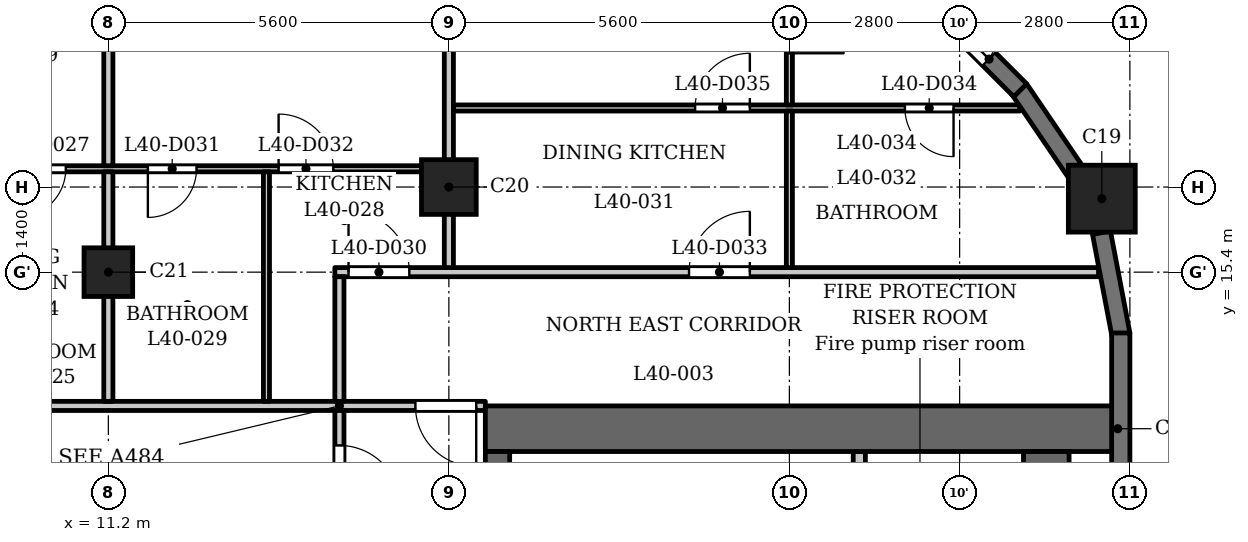
"""IFC4 building model, lengths in metres.
Left out: names, types, materials, properties, quantities, classifications, styles, units other than length and angle.
Written with IfcOpenShell. Run it as: python <this file> out.ifc"""

import sys

from ifc_helpers import new_model, si_unit, direction, frame, frame_2d, origin, origin_2d, place, context, subcontext, project, spatial, rectangle, extrude, element, fill, save


model = new_model("IFC4")
c1 = context("Model", 3, precision=1e-05, world=origin(), true_north=direction((0.0, 1.0)))
c2 = subcontext(c1, "Body", "Model", "MODEL_VIEW")
j1 = project(units=[si_unit("LENGTHUNIT", "METRE"), si_unit("PLANEANGLEUNIT", "RADIAN")], contexts=[c1])
p1 = place(None, origin())
s1 = spatial("IfcSite", under=j1, at=p1, CompositionType="ELEMENT")
p2 = place(p1, origin())
s2 = spatial("IfcBuilding", under=s1, at=p2, CompositionType="ELEMENT")
p3 = place(p2, frame((0.0, 0.0, 157.1)))
s3 = spatial("IfcBuildingStorey", under=s2, at=p3, CompositionType="ELEMENT", Elevation=157.1)
p4 = place(p3, frame((27.538, 16.609, 0.0), z_axis=(0.0, 0.0, 1.0), x_axis=(1.0, 0.0, 0.0)))
e1 = element("IfcColumn", 1, at=p4, inside=s3, PredefinedType="COLUMN", context=c2, shape_type="SweptSolid", body=[
    extrude(rectangle(XDim=1.1, YDim=1.1, at=origin_2d()), origin(), (0.0, 0.0, 1.0), 3.5),
])
p5 = place(p3, frame((16.8, 16.8, 0.0), z_axis=(0.0, 0.0, 1.0), x_axis=(1.0, 0.0, 0.0)))
e2 = element("IfcColumn", 2, at=p5, inside=s3, PredefinedType="COLUMN", context=c2, shape_type="SweptSolid", body=[
    extrude(rectangle(XDim=0.9, YDim=0.9, at=origin_2d()), origin(), (0.0, 0.0, 1.0), 3.5),
])
p6 = place(p3, frame((11.2, 15.4, 0.0), z_axis=(0.0, 0.0, 1.0), x_axis=(1.0, 0.0, 0.0)))
e3 = element("IfcColumn", 3, at=p6, inside=s3, PredefinedType="COLUMN", context=c2, shape_type="SweptSolid", body=[
    extrude(rectangle(XDim=0.8, YDim=0.8, at=origin_2d()), origin(), (0.0, 0.0, 1.0), 3.5),
])
p7 = place(p3, frame((27.85, 11.75, 0.0), z_axis=(0.0, 0.0, 1.0), x_axis=(0.0, 1.0, 0.0)))
e4 = element("IfcWall", 4, at=p7, inside=s3, PredefinedType="SOLIDWALL", context=c2, shape_type="SweptSolid", body=[
    extrude(rectangle(XDim=2.65, YDim=0.3, at=frame_2d((1.325, 0.0))), origin(), (0.0, 0.0, 1.0), 2.45),
])
p8 = place(p3, frame((27.853, 14.372, 0.0), z_axis=(0.0, 0.0, 1.0), x_axis=(-0.187302784601, 0.982302227871, 0.0)))
e5 = element("IfcWall", 5, at=p8, inside=s3, PredefinedType="SOLIDWALL", context=c2, shape_type="SweptSolid", body=[
    extrude(rectangle(XDim=1.706, YDim=0.3, at=frame_2d((0.853, 0.0))), origin(), (0.0, 0.0, 1.0), 2.45),
])
p9 = place(p3, frame((27.138, 17.002, 0.0), z_axis=(0.0, 0.0, 1.0), x_axis=(-0.562075160946, 0.827086158419, 0.0)))
e6 = element("IfcWall", 6, at=p9, inside=s3, PredefinedType="SOLIDWALL", context=c2, shape_type="SweptSolid", body=[
    extrude(rectangle(XDim=1.706, YDim=0.3, at=frame_2d((0.853, 0.0))), origin(), (0.0, 0.0, 1.0), 2.45),
])
p10 = place(p3, frame((26.197, 18.391, 0.0), z_axis=(0.0, 0.0, 1.0), x_axis=(-0.707060717099, 0.707152842274, 0.0)))
e7 = element("IfcWall", 7, at=p10, inside=s3, PredefinedType="SOLIDWALL", context=c2, shape_type="SweptSolid", body=[
    extrude(rectangle(XDim=2.65, YDim=0.3, at=frame_2d((1.325, 0.0))), origin(), (0.0, 0.0, 1.0), 2.45),
])
p11 = place(p10, frame((0.725, 0.0, 0.6)))
e8 = element("IfcOpeningElement", 8, at=p11, cuts=e7, PredefinedType="OPENING", context=c2, shape_type="SweptSolid", body=[
    extrude(rectangle(XDim=1.2, YDim=1.55, at=frame_2d((0.6, 0.775))), frame((0.0, 0.16, 0.0), z_axis=(0.0, -1.0, 0.0), x_axis=(1.0, 0.0, 0.0)), (0.0, 0.0, 1.0), 0.32),
])
p12 = place(p3, frame((17.4, 12.825, 0.0), z_axis=(0.0, 0.0, 1.0), x_axis=(1.0, 0.0, 0.0)))
e9 = element("IfcWall", 9, at=p12, inside=s3, PredefinedType="SHEAR", context=c2, shape_type="SweptSolid", body=[
    extrude(rectangle(XDim=10.4, YDim=0.75, at=frame_2d((5.2, 0.0))), origin(), (0.0, 0.0, 1.0), 3.2),
])
p13 = place(p3, frame((17.6, -12.45, 0.0), z_axis=(0.0, 0.0, 1.0), x_axis=(0.0, 1.0, 0.0)))
e10 = element("IfcWall", 10, at=p13, inside=s3, PredefinedType="SHEAR", context=c2, shape_type="SweptSolid", body=[
    extrude(rectangle(XDim=24.9, YDim=0.4, at=frame_2d((12.45, 0.0))), origin(), (0.0, 0.0, 1.0), 3.2),
])
p14 = place(p13, frame((8.65, 0.0, 0.0)))
e11 = element("IfcOpeningElement", 11, at=p14, cuts=e10, PredefinedType="OPENING", context=c2, shape_type="SweptSolid", body=[
    extrude(rectangle(XDim=0.9, YDim=2.1, at=frame_2d((0.45, 1.05))), frame((0.0, 0.21, 0.0), z_axis=(0.0, -1.0, 0.0), x_axis=(1.0, 0.0, 0.0)), (0.0, 0.0, 1.0), 0.42),
])
p15 = place(p13, frame((15.6, 0.0, 0.0)))
e12 = element("IfcOpeningElement", 12, at=p15, cuts=e10, PredefinedType="OPENING", context=c2, shape_type="SweptSolid", body=[
    extrude(rectangle(XDim=1.1, YDim=2.1, at=frame_2d((0.55, 1.05))), frame((0.0, 0.21, 0.0), z_axis=(0.0, -1.0, 0.0), x_axis=(1.0, 0.0, 0.0)), (0.0, 0.0, 1.0), 0.42),
])
p16 = place(p13, frame((18.0, 0.0, 0.0)))
e13 = element("IfcOpeningElement", 13, at=p16, cuts=e10, PredefinedType="OPENING", context=c2, shape_type="SweptSolid", body=[
    extrude(rectangle(XDim=1.1, YDim=2.1, at=frame_2d((0.55, 1.05))), frame((0.0, 0.21, 0.0), z_axis=(0.0, -1.0, 0.0), x_axis=(1.0, 0.0, 0.0)), (0.0, 0.0, 1.0), 0.42),
])
p17 = place(p13, frame((23.025, 0.0, 0.0)))
e14 = element("IfcOpeningElement", 14, at=p17, cuts=e10, PredefinedType="OPENING", context=c2, shape_type="SweptSolid", body=[
    extrude(rectangle(XDim=1.1, YDim=2.1, at=frame_2d((0.55, 1.05))), frame((0.0, 0.21, 0.0), z_axis=(0.0, -1.0, 0.0), x_axis=(1.0, 0.0, 0.0)), (0.0, 0.0, 1.0), 0.42),
])
p18 = place(p13, frame((0.775, 0.0, 0.0)))
e15 = element("IfcOpeningElement", 15, at=p18, cuts=e10, PredefinedType="OPENING", context=c2, shape_type="SweptSolid", body=[
    extrude(rectangle(XDim=1.1, YDim=2.1, at=frame_2d((0.55, 1.05))), frame((0.0, 0.21, 0.0), z_axis=(0.0, -1.0, 0.0), x_axis=(1.0, 0.0, 0.0)), (0.0, 0.0, 1.0), 0.42),
])
p19 = place(p13, frame((12.925, 0.0, 0.0)))
e16 = element("IfcOpeningElement", 16, at=p19, cuts=e10, PredefinedType="OPENING", context=c2, shape_type="SweptSolid", body=[
    extrude(rectangle(XDim=1.8, YDim=2.1, at=frame_2d((0.9, 1.05))), frame((0.0, 0.21, 0.0), z_axis=(0.0, -1.0, 0.0), x_axis=(1.0, 0.0, 0.0)), (0.0, 0.0, 1.0), 0.42),
])
p20 = place(p3, frame((26.625, -12.45, 0.0), z_axis=(0.0, 0.0, 1.0), x_axis=(0.0, 1.0, 0.0)))
e17 = element("IfcWall", 17, at=p20, inside=s3, PredefinedType="SHEAR", context=c2, shape_type="SweptSolid", body=[
    extrude(rectangle(XDim=24.9, YDim=0.75, at=frame_2d((12.45, 0.0))), origin(), (0.0, 0.0, 1.0), 3.2),
])
p21 = place(p3, frame((23.55, 9.8, 0.0), z_axis=(0.0, 0.0, 1.0), x_axis=(0.0, 1.0, 0.0)))
e18 = element("IfcWall", 18, at=p21, inside=s3, PredefinedType="PARTITIONING", context=c2, shape_type="SweptSolid", body=[
    extrude(rectangle(XDim=2.65, YDim=0.2, at=frame_2d((1.325, 0.0))), origin(), (0.0, 0.0, 1.0), 3.2),
])
p22 = place(p21, frame((0.875, 0.0, 0.0)))
e19 = element("IfcOpeningElement", 19, at=p22, cuts=e18, PredefinedType="OPENING", context=c2, shape_type="SweptSolid", body=[
    extrude(rectangle(XDim=0.9, YDim=2.1, at=frame_2d((0.45, 1.05))), frame((0.0, 0.11, 0.0), z_axis=(0.0, -1.0, 0.0), x_axis=(1.0, 0.0, 0.0)), (0.0, 0.0, 1.0), 0.22),
])
p23 = place(p3, frame((-17.4, 13.2, 0.0), z_axis=(0.0, 0.0, 1.0), x_axis=(1.0, 0.0, 0.0)))
e20 = element("IfcWall", 20, at=p23, inside=s3, PredefinedType="PARTITIONING", context=c2, shape_type="SweptSolid", body=[
    extrude(rectangle(XDim=34.8, YDim=0.15, at=frame_2d((17.4, 0.0))), origin(), (0.0, 0.0, 1.0), 3.2),
])
p24 = place(p23, frame((0.25, 0.0, 0.0)))
e21 = element("IfcOpeningElement", 21, at=p24, cuts=e20, PredefinedType="OPENING", context=c2, shape_type="SweptSolid", body=[
    extrude(rectangle(XDim=1.0, YDim=2.1, at=frame_2d((0.5, 1.05))), frame((0.0, 0.085, 0.0), z_axis=(0.0, -1.0, 0.0), x_axis=(1.0, 0.0, 0.0)), (0.0, 0.0, 1.0), 0.17),
])
p25 = place(p23, frame((33.65, 0.0, 0.0)))
e22 = element("IfcOpeningElement", 22, at=p25, cuts=e20, PredefinedType="OPENING", context=c2, shape_type="SweptSolid", body=[
    extrude(rectangle(XDim=1.0, YDim=2.1, at=frame_2d((0.5, 1.05))), frame((0.0, 0.085, 0.0), z_axis=(0.0, -1.0, 0.0), x_axis=(1.0, 0.0, 0.0)), (0.0, 0.0, 1.0), 0.17),
])
p26 = place(p23, frame((15.75, 0.0, 0.0)))
e23 = element("IfcOpeningElement", 23, at=p26, cuts=e20, PredefinedType="OPENING", context=c2, shape_type="SweptSolid", body=[
    extrude(rectangle(XDim=1.0, YDim=2.1, at=frame_2d((0.5, 1.05))), frame((0.0, 0.085, 0.0), z_axis=(0.0, -1.0, 0.0), x_axis=(1.0, 0.0, 0.0)), (0.0, 0.0, 1.0), 0.17),
])
p27 = place(p23, frame((20.85, 0.0, 0.0)))
e24 = element("IfcOpeningElement", 24, at=p27, cuts=e20, PredefinedType="OPENING", context=c2, shape_type="SweptSolid", body=[
    extrude(rectangle(XDim=1.0, YDim=2.1, at=frame_2d((0.5, 1.05))), frame((0.0, 0.085, 0.0), z_axis=(0.0, -1.0, 0.0), x_axis=(1.0, 0.0, 0.0)), (0.0, 0.0, 1.0), 0.17),
])
p28 = place(p23, frame((23.55, 0.0, 0.0)))
e25 = element("IfcOpeningElement", 25, at=p28, cuts=e20, PredefinedType="OPENING", context=c2, shape_type="SweptSolid", body=[
    extrude(rectangle(XDim=1.0, YDim=2.1, at=frame_2d((0.5, 1.05))), frame((0.0, 0.085, 0.0), z_axis=(0.0, -1.0, 0.0), x_axis=(1.0, 0.0, 0.0)), (0.0, 0.0, 1.0), 0.17),
])
p29 = place(p3, frame((14.925, 15.4, 0.0), z_axis=(0.0, 0.0, 1.0), x_axis=(1.0, 0.0, 0.0)))
e26 = element("IfcWall", 26, at=p29, inside=s3, PredefinedType="PARTITIONING", context=c2, shape_type="SweptSolid", body=[
    extrude(rectangle(XDim=12.559, YDim=0.15, at=frame_2d((6.279, 0.0))), origin(), (0.0, 0.0, 1.0), 3.2),
])
p30 = place(p29, frame((0.225, 0.0, 0.0)))
e27 = element("IfcOpeningElement", 27, at=p30, cuts=e26, PredefinedType="OPENING", context=c2, shape_type="SweptSolid", body=[
    extrude(rectangle(XDim=1.0, YDim=2.1, at=frame_2d((0.5, 1.05))), frame((0.0, 0.085, 0.0), z_axis=(0.0, -1.0, 0.0), x_axis=(1.0, 0.0, 0.0)), (0.0, 0.0, 1.0), 0.17),
])
p31 = place(p29, frame((5.825, 0.0, 0.0)))
e28 = element("IfcOpeningElement", 28, at=p31, cuts=e26, PredefinedType="OPENING", context=c2, shape_type="SweptSolid", body=[
    extrude(rectangle(XDim=1.0, YDim=2.1, at=frame_2d((0.5, 1.05))), frame((0.0, 0.085, 0.0), z_axis=(0.0, -1.0, 0.0), x_axis=(1.0, 0.0, 0.0)), (0.0, 0.0, 1.0), 0.17),
])
p32 = place(p3, frame((-16.725, 17.1, 0.0), z_axis=(0.0, 0.0, 1.0), x_axis=(1.0, 0.0, 0.0)))
e29 = element("IfcWall", 29, at=p32, inside=s3, PredefinedType="PARTITIONING", context=c2, shape_type="SweptSolid", body=[
    extrude(rectangle(XDim=33.45, YDim=0.1, at=frame_2d((16.725, 0.0))), origin(), (0.0, 0.0, 1.0), 3.2),
])
p33 = place(p32, frame((11.925, 0.0, 0.0)))
e30 = element("IfcOpeningElement", 30, at=p33, cuts=e29, PredefinedType="OPENING", context=c2, shape_type="SweptSolid", body=[
    extrude(rectangle(XDim=0.9, YDim=2.1, at=frame_2d((0.45, 1.05))), frame((0.0, 0.06, 0.0), z_axis=(0.0, -1.0, 0.0), x_axis=(1.0, 0.0, 0.0)), (0.0, 0.0, 1.0), 0.12),
])
p34 = place(p32, frame((15.175, 0.0, 0.0)))
e31 = element("IfcOpeningElement", 31, at=p34, cuts=e29, PredefinedType="OPENING", context=c2, shape_type="SweptSolid", body=[
    extrude(rectangle(XDim=0.9, YDim=2.1, at=frame_2d((0.45, 1.05))), frame((0.0, 0.06, 0.0), z_axis=(0.0, -1.0, 0.0), x_axis=(1.0, 0.0, 0.0)), (0.0, 0.0, 1.0), 0.12),
])
p35 = place(p32, frame((6.575, 0.0, 0.0)))
e32 = element("IfcOpeningElement", 32, at=p35, cuts=e29, PredefinedType="OPENING", context=c2, shape_type="SweptSolid", body=[
    extrude(rectangle(XDim=0.9, YDim=2.1, at=frame_2d((0.45, 1.05))), frame((0.0, 0.06, 0.0), z_axis=(0.0, -1.0, 0.0), x_axis=(1.0, 0.0, 0.0)), (0.0, 0.0, 1.0), 0.12),
])
p36 = place(p32, frame((17.375, 0.0, 0.0)))
e33 = element("IfcOpeningElement", 33, at=p36, cuts=e29, PredefinedType="OPENING", context=c2, shape_type="SweptSolid", body=[
    extrude(rectangle(XDim=0.8, YDim=2.1, at=frame_2d((0.4, 1.05))), frame((0.0, 0.06, 0.0), z_axis=(0.0, -1.0, 0.0), x_axis=(1.0, 0.0, 0.0)), (0.0, 0.0, 1.0), 0.12),
])
p37 = place(p32, frame((20.025, 0.0, 0.0)))
e34 = element("IfcOpeningElement", 34, at=p37, cuts=e29, PredefinedType="OPENING", context=c2, shape_type="SweptSolid", body=[
    extrude(rectangle(XDim=0.9, YDim=2.1, at=frame_2d((0.45, 1.05))), frame((0.0, 0.06, 0.0), z_axis=(0.0, -1.0, 0.0), x_axis=(1.0, 0.0, 0.0)), (0.0, 0.0, 1.0), 0.12),
])
p38 = place(p32, frame((26.425, 0.0, 0.0)))
e35 = element("IfcOpeningElement", 35, at=p38, cuts=e29, PredefinedType="OPENING", context=c2, shape_type="SweptSolid", body=[
    extrude(rectangle(XDim=0.8, YDim=2.1, at=frame_2d((0.4, 1.05))), frame((0.0, 0.06, 0.0), z_axis=(0.0, -1.0, 0.0), x_axis=(1.0, 0.0, 0.0)), (0.0, 0.0, 1.0), 0.12),
])
p39 = place(p32, frame((23.025, 0.0, 0.0)))
e36 = element("IfcOpeningElement", 36, at=p39, cuts=e29, PredefinedType="OPENING", context=c2, shape_type="SweptSolid", body=[
    extrude(rectangle(XDim=0.9, YDim=2.1, at=frame_2d((0.45, 1.05))), frame((0.0, 0.06, 0.0), z_axis=(0.0, -1.0, 0.0), x_axis=(1.0, 0.0, 0.0)), (0.0, 0.0, 1.0), 0.12),
])
p40 = place(p32, frame((28.575, 0.0, 0.0)))
e37 = element("IfcOpeningElement", 37, at=p40, cuts=e29, PredefinedType="OPENING", context=c2, shape_type="SweptSolid", body=[
    extrude(rectangle(XDim=0.8, YDim=2.1, at=frame_2d((0.4, 1.05))), frame((0.0, 0.06, 0.0), z_axis=(0.0, -1.0, 0.0), x_axis=(1.0, 0.0, 0.0)), (0.0, 0.0, 1.0), 0.12),
])
p41 = place(p32, frame((30.725, 0.0, 0.0)))
e38 = element("IfcOpeningElement", 38, at=p41, cuts=e29, PredefinedType="OPENING", context=c2, shape_type="SweptSolid", body=[
    extrude(rectangle(XDim=0.9, YDim=2.1, at=frame_2d((0.45, 1.05))), frame((0.0, 0.06, 0.0), z_axis=(0.0, -1.0, 0.0), x_axis=(1.0, 0.0, 0.0)), (0.0, 0.0, 1.0), 0.12),
])
p42 = place(p3, frame((16.875, 18.1, 0.0), z_axis=(0.0, 0.0, 1.0), x_axis=(1.0, 0.0, 0.0)))
e39 = element("IfcWall", 39, at=p42, inside=s3, PredefinedType="PARTITIONING", context=c2, shape_type="SweptSolid", body=[
    extrude(rectangle(XDim=9.315, YDim=0.1, at=frame_2d((4.658, 0.0))), origin(), (0.0, 0.0, 1.0), 3.2),
])
p43 = place(p42, frame((7.425, 0.0, 0.0)))
e40 = element("IfcOpeningElement", 40, at=p43, cuts=e39, PredefinedType="OPENING", context=c2, shape_type="SweptSolid", body=[
    extrude(rectangle(XDim=0.8, YDim=2.1, at=frame_2d((0.4, 1.05))), frame((0.0, 0.06, 0.0), z_axis=(0.0, -1.0, 0.0), x_axis=(1.0, 0.0, 0.0)), (0.0, 0.0, 1.0), 0.12),
])
p44 = place(p42, frame((3.975, 0.0, 0.0)))
e41 = element("IfcOpeningElement", 41, at=p44, cuts=e39, PredefinedType="OPENING", context=c2, shape_type="SweptSolid", body=[
    extrude(rectangle(XDim=0.9, YDim=2.1, at=frame_2d((0.45, 1.05))), frame((0.0, 0.06, 0.0), z_axis=(0.0, -1.0, 0.0), x_axis=(1.0, 0.0, 0.0)), (0.0, 0.0, 1.0), 0.12),
])
p45 = place(p3, frame((11.2, 13.275, 0.0), z_axis=(0.0, 0.0, 1.0), x_axis=(0.0, 1.0, 0.0)))
e42 = element("IfcWall", 42, at=p45, inside=s3, PredefinedType="PARTITIONING", context=c2, shape_type="SweptSolid", body=[
    extrude(rectangle(XDim=3.775, YDim=0.15, at=frame_2d((1.888, 0.0))), origin(), (0.0, 0.0, 1.0), 3.2),
])
p46 = place(p3, frame((11.2, 17.15, 0.0), z_axis=(0.0, 0.0, 1.0), x_axis=(0.0, 1.0, 0.0)))
e43 = element("IfcWall", 43, at=p46, inside=s3, PredefinedType="PARTITIONING", context=c2, shape_type="SweptSolid", body=[
    extrude(rectangle(XDim=5.78, YDim=0.15, at=frame_2d((2.89, 0.0))), origin(), (0.0, 0.0, 1.0), 3.2),
])
p47 = place(p3, frame((13.8, 13.275, 0.0), z_axis=(0.0, 0.0, 1.0), x_axis=(0.0, 1.0, 0.0)))
e44 = element("IfcWall", 44, at=p47, inside=s3, PredefinedType="PARTITIONING", context=c2, shape_type="SweptSolid", body=[
    extrude(rectangle(XDim=3.775, YDim=0.1, at=frame_2d((1.888, 0.0))), origin(), (0.0, 0.0, 1.0), 3.2),
])
p48 = place(p3, frame((15.0, 6.769, 0.0), z_axis=(0.0, 0.0, 1.0), x_axis=(0.0, 1.0, 0.0)))
e45 = element("IfcWall", 45, at=p48, inside=s3, PredefinedType="PARTITIONING", context=c2, shape_type="SweptSolid", body=[
    extrude(rectangle(XDim=6.356, YDim=0.15, at=frame_2d((3.178, 0.0))), origin(), (0.0, 0.0, 1.0), 3.2),
])
p49 = place(p48, frame((4.781, 0.0, 0.0)))
e46 = element("IfcOpeningElement", 46, at=p49, cuts=e45, PredefinedType="OPENING", context=c2, shape_type="SweptSolid", body=[
    extrude(rectangle(XDim=1.0, YDim=2.1, at=frame_2d((0.5, 1.05))), frame((0.0, 0.085, 0.0), z_axis=(0.0, -1.0, 0.0), x_axis=(1.0, 0.0, 0.0)), (0.0, 0.0, 1.0), 0.17),
])
p50 = place(p3, frame((15.0, 13.275, 0.0), z_axis=(0.0, 0.0, 1.0), x_axis=(0.0, 1.0, 0.0)))
e47 = element("IfcWall", 47, at=p50, inside=s3, PredefinedType="PARTITIONING", context=c2, shape_type="SweptSolid", body=[
    extrude(rectangle(XDim=2.05, YDim=0.15, at=frame_2d((1.025, 0.0))), origin(), (0.0, 0.0, 1.0), 3.2),
])
p51 = place(p3, frame((16.8, 15.475, 0.0), z_axis=(0.0, 0.0, 1.0), x_axis=(0.0, 1.0, 0.0)))
e48 = element("IfcWall", 48, at=p51, inside=s3, PredefinedType="PARTITIONING", context=c2, shape_type="SweptSolid", body=[
    extrude(rectangle(XDim=7.455, YDim=0.15, at=frame_2d((3.728, 0.0))), origin(), (0.0, 0.0, 1.0), 3.2),
])
p52 = place(p3, frame((22.4, 15.475, 0.0), z_axis=(0.0, 0.0, 1.0), x_axis=(0.0, 1.0, 0.0)))
e49 = element("IfcWall", 49, at=p52, inside=s3, PredefinedType="PARTITIONING", context=c2, shape_type="SweptSolid", body=[
    extrude(rectangle(XDim=2.575, YDim=0.1, at=frame_2d((1.288, 0.0))), origin(), (0.0, 0.0, 1.0), 3.2),
])
p53 = place(p3, frame((22.4, 18.15, 0.0), z_axis=(0.0, 0.0, 1.0), x_axis=(0.0, 1.0, 0.0)))
e50 = element("IfcWall", 50, at=p53, inside=s3, PredefinedType="PARTITIONING", context=c2, shape_type="SweptSolid", body=[
    extrude(rectangle(XDim=3.57, YDim=0.1, at=frame_2d((1.785, 0.0))), origin(), (0.0, 0.0, 1.0), 3.2),
])
p54 = place(p53, frame((0.85, 0.0, 0.0)))
e51 = element("IfcOpeningElement", 51, at=p54, cuts=e50, PredefinedType="OPENING", context=c2, shape_type="SweptSolid", body=[
    extrude(rectangle(XDim=0.9, YDim=2.1, at=frame_2d((0.45, 1.05))), frame((0.0, 0.06, 0.0), z_axis=(0.0, -1.0, 0.0), x_axis=(1.0, 0.0, 0.0)), (0.0, 0.0, 1.0), 0.12),
])
p55 = place(p49, origin())
e52 = element("IfcDoor", 52, at=p55, inside=s3, OperationType="SINGLE_SWING_LEFT", PredefinedType="DOOR", context=c2, shape_type="SweptSolid", body=[
    extrude(rectangle(XDim=1.0, YDim=2.1, at=frame_2d((0.5, 1.05))), frame((0.0, 0.025, 0.0), z_axis=(0.0, -1.0, 0.0), x_axis=(1.0, 0.0, 0.0)), (0.0, 0.0, 1.0), 0.05),
])
fill(e46, e52)
p56 = place(p25, origin())
e53 = element("IfcDoor", 53, at=p56, inside=s3, OperationType="SINGLE_SWING_RIGHT", PredefinedType="DOOR", context=c2, shape_type="SweptSolid", body=[
    extrude(rectangle(XDim=1.0, YDim=2.1, at=frame_2d((0.5, 1.05))), frame((0.0, 0.025, 0.0), z_axis=(0.0, -1.0, 0.0), x_axis=(1.0, 0.0, 0.0)), (0.0, 0.0, 1.0), 0.05),
])
fill(e22, e53)
p57 = place(p38, origin())
e54 = element("IfcDoor", 54, at=p57, inside=s3, OperationType="SINGLE_SWING_LEFT", PredefinedType="DOOR", context=c2, shape_type="SweptSolid", body=[
    extrude(rectangle(XDim=0.8, YDim=2.1, at=frame_2d((0.4, 1.05))), frame((0.0, 0.025, 0.0), z_axis=(0.0, -1.0, 0.0), x_axis=(1.0, 0.0, 0.0)), (0.0, 0.0, 1.0), 0.05),
])
fill(e35, e54)
p58 = place(p30, origin())
e55 = element("IfcDoor", 55, at=p58, inside=s3, OperationType="SINGLE_SWING_RIGHT", PredefinedType="DOOR", context=c2, shape_type="SweptSolid", body=[
    extrude(rectangle(XDim=1.0, YDim=2.1, at=frame_2d((0.5, 1.05))), frame((0.0, 0.025, 0.0), z_axis=(0.0, -1.0, 0.0), x_axis=(1.0, 0.0, 0.0)), (0.0, 0.0, 1.0), 0.05),
])
fill(e27, e55)
p59 = place(p40, origin())
e56 = element("IfcDoor", 56, at=p59, inside=s3, OperationType="SINGLE_SWING_LEFT", PredefinedType="DOOR", context=c2, shape_type="SweptSolid", body=[
    extrude(rectangle(XDim=0.8, YDim=2.1, at=frame_2d((0.4, 1.05))), frame((0.0, 0.025, 0.0), z_axis=(0.0, -1.0, 0.0), x_axis=(1.0, 0.0, 0.0)), (0.0, 0.0, 1.0), 0.05),
])
fill(e37, e56)
p60 = place(p41, origin())
e57 = element("IfcDoor", 57, at=p60, inside=s3, OperationType="SINGLE_SWING_RIGHT", PredefinedType="DOOR", context=c2, shape_type="SweptSolid", body=[
    extrude(rectangle(XDim=0.9, YDim=2.1, at=frame_2d((0.45, 1.05))), frame((0.0, 0.025, 0.0), z_axis=(0.0, -1.0, 0.0), x_axis=(1.0, 0.0, 0.0)), (0.0, 0.0, 1.0), 0.05),
])
fill(e38, e57)
p61 = place(p31, origin())
e58 = element("IfcDoor", 58, at=p61, inside=s3, OperationType="SINGLE_SWING_LEFT", PredefinedType="DOOR", context=c2, shape_type="SweptSolid", body=[
    extrude(rectangle(XDim=1.0, YDim=2.1, at=frame_2d((0.5, 1.05))), frame((0.0, 0.025, 0.0), z_axis=(0.0, -1.0, 0.0), x_axis=(1.0, 0.0, 0.0)), (0.0, 0.0, 1.0), 0.05),
])
fill(e28, e58)
p62 = place(p43, origin())
e59 = element("IfcDoor", 59, at=p62, inside=s3, OperationType="SINGLE_SWING_RIGHT", PredefinedType="DOOR", context=c2, shape_type="SweptSolid", body=[
    extrude(rectangle(XDim=0.8, YDim=2.1, at=frame_2d((0.4, 1.05))), frame((0.0, 0.025, 0.0), z_axis=(0.0, -1.0, 0.0), x_axis=(1.0, 0.0, 0.0)), (0.0, 0.0, 1.0), 0.05),
])
fill(e40, e59)
p63 = place(p44, origin())
e60 = element("IfcDoor", 60, at=p63, inside=s3, OperationType="SINGLE_SWING_LEFT", PredefinedType="DOOR", context=c2, shape_type="SweptSolid", body=[
    extrude(rectangle(XDim=0.9, YDim=2.1, at=frame_2d((0.45, 1.05))), frame((0.0, 0.025, 0.0), z_axis=(0.0, -1.0, 0.0), x_axis=(1.0, 0.0, 0.0)), (0.0, 0.0, 1.0), 0.05),
])
fill(e41, e60)
p64 = place(p54, origin())
e61 = element("IfcDoor", 61, at=p64, inside=s3, OperationType="SINGLE_SWING_LEFT", PredefinedType="DOOR", context=c2, shape_type="SweptSolid", body=[
    extrude(rectangle(XDim=0.9, YDim=2.1, at=frame_2d((0.45, 1.05))), frame((0.0, 0.025, 0.0), z_axis=(0.0, -1.0, 0.0), x_axis=(1.0, 0.0, 0.0)), (0.0, 0.0, 1.0), 0.05),
])
fill(e51, e61)
p65 = place(p11, origin())
e62 = element("IfcWindow", 62, at=p65, inside=s3, PartitioningType="SINGLE_PANEL", PredefinedType="WINDOW", context=c2, shape_type="SweptSolid", body=[
    extrude(rectangle(XDim=1.2, YDim=1.55, at=frame_2d((0.6, 0.775))), frame((0.0, 0.03, 0.0), z_axis=(0.0, -1.0, 0.0), x_axis=(1.0, 0.0, 0.0)), (0.0, 0.0, 1.0), 0.06),
])
fill(e8, e62)
save(model, sys.argv[1])
